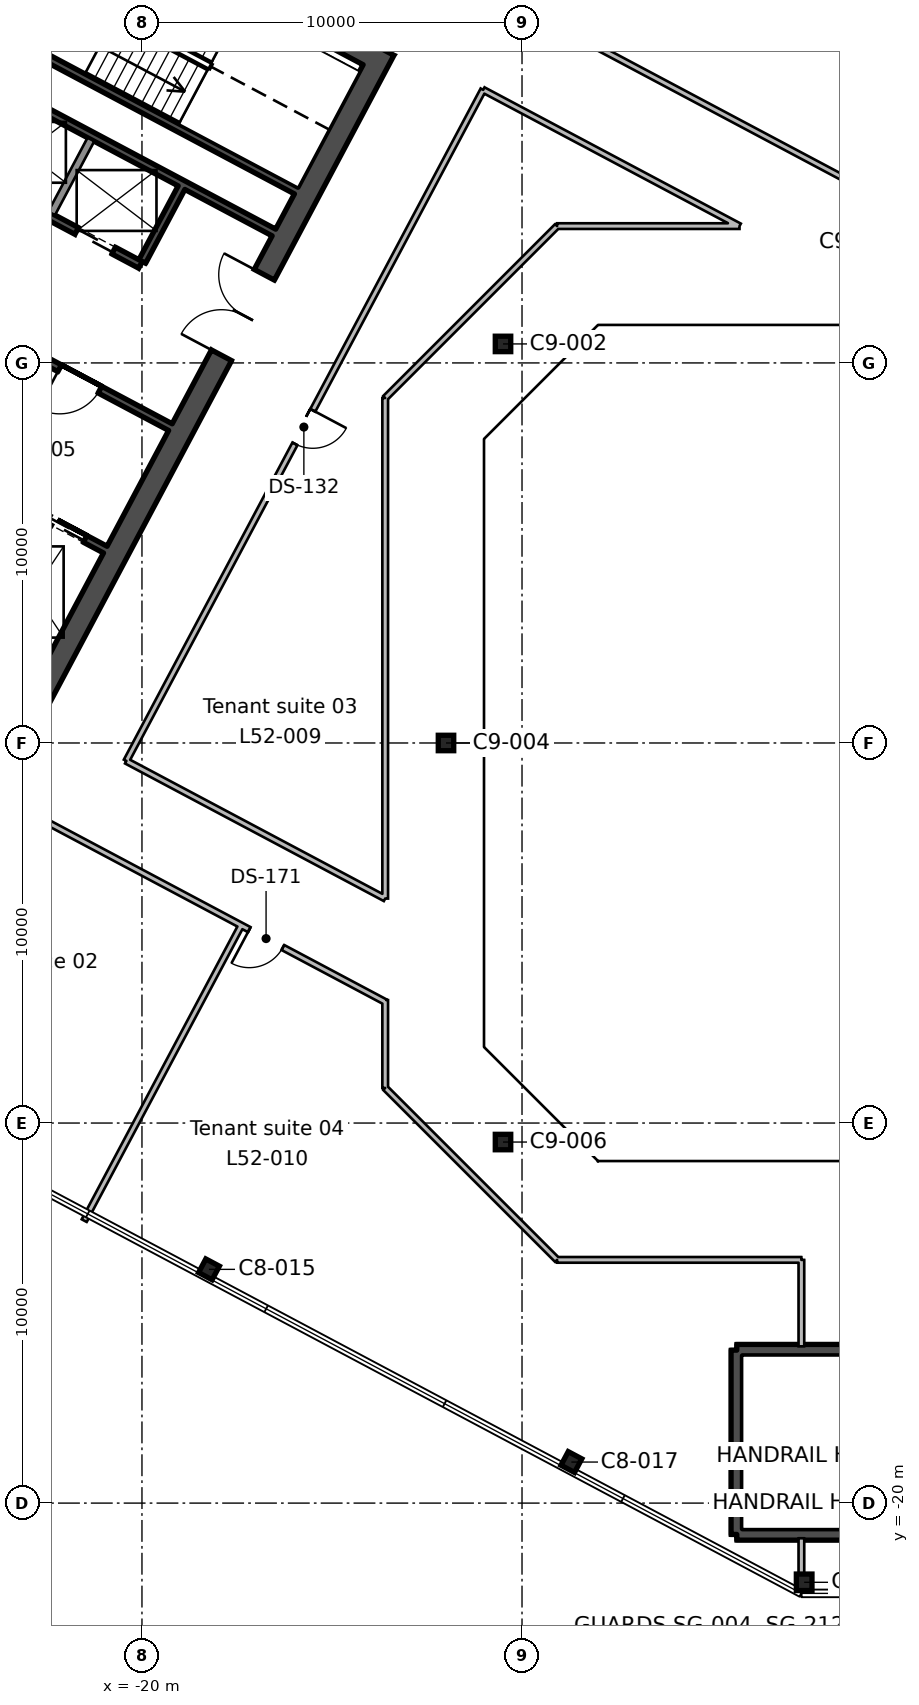
"""IFC4 building model, lengths in metres.
Left out: names, types, materials, properties, quantities, classifications, styles, units other than length and angle.
Written with IfcOpenShell. Run it as: python <this file> out.ifc"""

import sys

from ifc_helpers import new_model, si_unit, direction, frame, frame_2d, origin, origin_2d, place, context, subcontext, project, spatial, rectangle, hollow_rectangle, i_section, extrude, element, fill, save


model = new_model("IFC4")
c1 = context("Model", 3, precision=1e-05, world=origin(), true_north=direction((0.0, 1.0)))
c2 = subcontext(c1, "Body", "Model", "MODEL_VIEW")
j1 = project(units=[si_unit("LENGTHUNIT", "METRE"), si_unit("PLANEANGLEUNIT", "RADIAN")], contexts=[c1])
p1 = place(None, origin())
s1 = spatial("IfcSite", under=j1, at=p1, CompositionType="ELEMENT")
p2 = place(p1, origin())
s2 = spatial("IfcBuilding", under=s1, at=p2, CompositionType="ELEMENT")
p3 = place(p2, frame((0.0, 0.0, 236.4)))
s3 = spatial("IfcBuildingStorey", under=s2, at=p3, CompositionType="ELEMENT", Elevation=236.4)
p4 = place(p3, frame((-2.576, -22.084, 0.0), z_axis=(0.0, 0.0, 1.0), x_axis=(1.0, 0.0, 0.0)))
e1 = element("IfcColumn", 1, at=p4, inside=s3, PredefinedType="COLUMN", context=c2, shape_type="SweptSolid", body=[
    extrude(i_section(OverallWidth=0.412, OverallDepth=0.434, WebThickness=0.036, FlangeThickness=0.057, FilletRadius=0.015, at=origin_2d()), origin(), (0.0, 0.0, 1.0), 3.9),
])
for number, where, z_axis, x_axis in (
    (2, (-8.701, -18.92, 0.0), (0.0, 0.0, 1.0), (0.883, -0.469, 0.0)),
    (3, (-18.237, -13.85, 0.0), (0.0, 0.0, 1.0), (0.883, -0.469, 0.0)),
):
    element("IfcColumn", number, at=place(p3, frame(where, z_axis=z_axis, x_axis=x_axis)), inside=s3, PredefinedType="COLUMN", context=c2, shape_type="SweptSolid", body=[
        extrude(i_section(OverallWidth=0.404, OverallDepth=0.406, WebThickness=0.027, FlangeThickness=0.044, FilletRadius=0.015, at=origin_2d()), origin(), (0.0, 0.0, 1.0), 3.9),
    ])
for number, where, z_axis, x_axis in (
    (4, (-10.5, -10.5, 0.0), (0.0, 0.0, 1.0), (1.0, 0.0, 0.0)),
    (5, (-12.0, 0.0, 0.0), (0.0, 0.0, 1.0), (1.0, 0.0, 0.0)),
    (6, (-10.5, 10.5, 0.0), (0.0, 0.0, 1.0), (1.0, 0.0, 0.0)),
):
    element("IfcColumn", number, at=place(p3, frame(where, z_axis=z_axis, x_axis=x_axis)), inside=s3, PredefinedType="COLUMN", context=c2, shape_type="SweptSolid", body=[
        extrude(hollow_rectangle(XDim=0.406, YDim=0.406, WallThickness=0.015, InnerFilletRadius=0.007, OuterFilletRadius=0.022, at=origin_2d()), origin(), (0.0, 0.0, 1.0), 3.9),
    ])
p5 = place(p3, frame((-13.635, 18.236, 0.0), z_axis=(0.0, 0.0, 1.0), x_axis=(-0.469478769487, -0.88294376095, 0.0)))
e7 = element("IfcWall", 7, at=p5, inside=s3, PredefinedType="SHEAR", context=c2, shape_type="SweptSolid", body=[
    extrude(rectangle(XDim=19.4, YDim=0.6, at=frame_2d((9.7, 0.0))), origin(), (0.0, 0.0, 1.0), 3.9),
])
p6 = place(p5, frame((6.7, 0.0, 0.0)))
e8 = element("IfcOpeningElement", 8, at=p6, cuts=e7, PredefinedType="OPENING", context=c2, shape_type="SweptSolid", body=[
    extrude(rectangle(XDim=2.4, YDim=2.4, at=frame_2d((1.2, 1.2))), frame((0.0, 0.31, 0.0), z_axis=(0.0, -1.0, 0.0), x_axis=(1.0, 0.0, 0.0)), (0.0, 0.0, 1.0), 0.62),
])
p7 = place(p3, frame((-14.041, 18.112, 0.0), z_axis=(0.0, 0.0, 1.0), x_axis=(-0.882947755831, 0.46947125628, 0.0)))
e9 = element("IfcWall", 9, at=p7, inside=s3, PredefinedType="SHEAR", context=c2, shape_type="SweptSolid", body=[
    extrude(rectangle(XDim=20.2, YDim=0.6, at=frame_2d((10.1, 0.0))), origin(), (0.0, 0.0, 1.0), 3.9),
])
p8 = place(p3, frame((-18.96, 14.611, 0.0), z_axis=(0.0, 0.0, 1.0), x_axis=(-0.4694473164, -0.882960484464, 0.0)))
e10 = element("IfcWall", 10, at=p8, inside=s3, PredefinedType="SHEAR", context=c2, shape_type="SweptSolid", body=[
    extrude(rectangle(XDim=2.2, YDim=0.2, at=frame_2d((1.1, 0.0))), origin(), (0.0, 0.0, 1.0), 3.9),
])
p9 = place(p3, frame((-21.344, 15.879, 0.0), z_axis=(0.0, 0.0, 1.0), x_axis=(-0.4694473164, -0.882960484464, 0.0)))
e11 = element("IfcWall", 11, at=p9, inside=s3, PredefinedType="SOLIDWALL", context=c2, shape_type="SweptSolid", body=[
    extrude(rectangle(XDim=2.2, YDim=0.2, at=frame_2d((1.1, 0.0))), origin(), (0.0, 0.0, 1.0), 3.9),
])
p10 = place(p3, frame((-21.333, 21.649, 0.0), z_axis=(0.0, 0.0, 1.0), x_axis=(-0.469494272526, -0.882935517501, 0.0)))
e12 = element("IfcWall", 12, at=p10, inside=s3, PredefinedType="SHEAR", context=c2, shape_type="SweptSolid", body=[
    extrude(rectangle(XDim=7.3, YDim=0.2, at=frame_2d((3.65, 0.0))), origin(), (0.0, 0.0, 1.0), 3.9),
])
p11 = place(p10, frame((1.3, 0.0, 0.0)))
e13 = element("IfcOpeningElement", 13, at=p11, cuts=e12, PredefinedType="OPENING", context=c2, shape_type="SweptSolid", body=[
    extrude(rectangle(XDim=1.2, YDim=2.1, at=frame_2d((0.6, 1.05))), frame((0.0, 0.11, 0.0), z_axis=(0.0, -1.0, 0.0), x_axis=(1.0, 0.0, 0.0)), (0.0, 0.0, 1.0), 0.22),
])
p12 = place(p3, frame((-15.942, 14.536, 0.0), z_axis=(0.0, 0.0, 1.0), x_axis=(-0.882946947542, 0.469472776449, 0.0)))
e14 = element("IfcWall", 14, at=p12, inside=s3, PredefinedType="SHEAR", context=c2, shape_type="SweptSolid", body=[
    extrude(rectangle(XDim=8.0, YDim=0.2, at=frame_2d((4.0, 0.0))), origin(), (0.0, 0.0, 1.0), 3.9),
])
p13 = place(p3, frame((-16.529, 13.432, 0.0), z_axis=(0.0, 0.0, 1.0), x_axis=(-0.88295287151, 0.469461634952, 0.0)))
e15 = element("IfcWall", 15, at=p13, inside=s3, PredefinedType="SHEAR", context=c2, shape_type="SweptSolid", body=[
    extrude(rectangle(XDim=8.0, YDim=0.2, at=frame_2d((4.0, 0.0))), origin(), (0.0, 0.0, 1.0), 3.9),
])
p14 = place(p3, frame((-20.04, 12.581, 0.0), z_axis=(0.0, 0.0, 1.0), x_axis=(-0.882942972946, 0.469480251476, 0.0)))
e16 = element("IfcWall", 16, at=p14, inside=s3, PredefinedType="SHEAR", context=c2, shape_type="SweptSolid", body=[
    extrude(rectangle(XDim=5.4, YDim=0.2, at=frame_2d((2.7, 0.0))), origin(), (0.0, 0.0, 1.0), 3.9),
])
p15 = place(p14, frame((0.8, 0.0, 0.0)))
e17 = element("IfcOpeningElement", 17, at=p15, cuts=e16, PredefinedType="OPENING", context=c2, shape_type="SweptSolid", body=[
    extrude(rectangle(XDim=1.1, YDim=2.1, at=frame_2d((0.55, 1.05))), frame((0.0, 0.11, 0.0), z_axis=(0.0, -1.0, 0.0), x_axis=(1.0, 0.0, 0.0)), (0.0, 0.0, 1.0), 0.22),
])
p16 = place(p14, frame((3.5, 0.0, 0.0)))
e18 = element("IfcOpeningElement", 18, at=p16, cuts=e16, PredefinedType="OPENING", context=c2, shape_type="SweptSolid", body=[
    extrude(rectangle(XDim=1.1, YDim=2.1, at=frame_2d((0.55, 1.05))), frame((0.0, 0.11, 0.0), z_axis=(0.0, -1.0, 0.0), x_axis=(1.0, 0.0, 0.0)), (0.0, 0.0, 1.0), 0.22),
])
p17 = place(p3, frame((-19.252, 8.311, 0.0), z_axis=(0.0, 0.0, 1.0), x_axis=(-0.882955722218, 0.469456273365, 0.0)))
e19 = element("IfcWall", 19, at=p17, inside=s3, PredefinedType="SHEAR", context=c2, shape_type="SweptSolid", body=[
    extrude(rectangle(XDim=10.0, YDim=0.2, at=frame_2d((5.0, 0.0))), origin(), (0.0, 0.0, 1.0), 3.9),
])
p18 = place(p17, frame((2.1, 0.0, 0.0)))
e20 = element("IfcOpeningElement", 20, at=p18, cuts=e19, PredefinedType="OPENING", context=c2, shape_type="SweptSolid", body=[
    extrude(rectangle(XDim=1.2, YDim=2.1, at=frame_2d((0.6, 1.05))), frame((0.0, 0.11, 0.0), z_axis=(0.0, -1.0, 0.0), x_axis=(1.0, 0.0, 0.0)), (0.0, 0.0, 1.0), 0.22),
])
p19 = place(p17, frame((4.96, 0.0, 0.0)))
e21 = element("IfcOpeningElement", 21, at=p19, cuts=e19, PredefinedType="OPENING", context=c2, shape_type="SweptSolid", body=[
    extrude(rectangle(XDim=0.9, YDim=2.1, at=frame_2d((0.45, 1.05))), frame((0.0, 0.11, 0.0), z_axis=(0.0, -1.0, 0.0), x_axis=(1.0, 0.0, 0.0)), (0.0, 0.0, 1.0), 0.22),
])
p20 = place(p17, frame((7.66, 0.0, 0.0)))
e22 = element("IfcOpeningElement", 22, at=p20, cuts=e19, PredefinedType="OPENING", context=c2, shape_type="SweptSolid", body=[
    extrude(rectangle(XDim=0.9, YDim=2.1, at=frame_2d((0.45, 1.05))), frame((0.0, 0.11, 0.0), z_axis=(0.0, -1.0, 0.0), x_axis=(1.0, 0.0, 0.0)), (0.0, 0.0, 1.0), 0.22),
])
p21 = place(p3, frame((-20.965, 5.088, 0.0), z_axis=(0.0, 0.0, 1.0), x_axis=(-0.882925986334, 0.469512196493, 0.0)))
e23 = element("IfcWall", 23, at=p21, inside=s3, PredefinedType="SHEAR", context=c2, shape_type="SweptSolid", body=[
    extrude(rectangle(XDim=4.5, YDim=0.2, at=frame_2d((2.25, 0.0))), origin(), (0.0, 0.0, 1.0), 3.9),
])
p22 = place(p21, frame((0.6, 0.0, 0.0)))
e24 = element("IfcOpeningElement", 24, at=p22, cuts=e23, PredefinedType="OPENING", context=c2, shape_type="SweptSolid", body=[
    extrude(rectangle(XDim=1.1, YDim=2.1, at=frame_2d((0.55, 1.05))), frame((0.0, 0.11, 0.0), z_axis=(0.0, -1.0, 0.0), x_axis=(1.0, 0.0, 0.0)), (0.0, 0.0, 1.0), 0.22),
])
p23 = place(p3, frame((3.95, -20.825, 0.0), z_axis=(0.0, 0.0, 1.0), x_axis=(-1.0, 0.0, 0.0)))
e25 = element("IfcWall", 25, at=p23, inside=s3, PredefinedType="SHEAR", context=c2, shape_type="SweptSolid", body=[
    extrude(rectangle(XDim=8.3, YDim=0.3, at=frame_2d((4.15, 0.0))), origin(), (0.0, 0.0, 1.0), 3.9),
])
p24 = place(p3, frame((-4.35, -20.825, 0.0), z_axis=(0.0, 0.0, 1.0), x_axis=(0.0, 1.0, 0.0)))
e26 = element("IfcWall", 26, at=p24, inside=s3, PredefinedType="SHEAR", context=c2, shape_type="SweptSolid", body=[
    extrude(rectangle(XDim=4.85, YDim=0.3, at=frame_2d((2.425, 0.0))), origin(), (0.0, 0.0, 1.0), 3.9),
])
p25 = place(p3, frame((-4.35, -15.975, 0.0), z_axis=(0.0, 0.0, 1.0), x_axis=(1.0, 0.0, 0.0)))
e27 = element("IfcWall", 27, at=p25, inside=s3, PredefinedType="SHEAR", context=c2, shape_type="SweptSolid", body=[
    extrude(rectangle(XDim=8.3, YDim=0.3, at=frame_2d((4.15, 0.0))), origin(), (0.0, 0.0, 1.0), 3.9),
])
p26 = place(p25, frame((6.05, 0.0, 0.0)))
e28 = element("IfcOpeningElement", 28, at=p26, cuts=e27, PredefinedType="OPENING", context=c2, shape_type="SweptSolid", body=[
    extrude(rectangle(XDim=1.9, YDim=2.1, at=frame_2d((0.95, 1.05))), frame((0.0, 0.16, 0.0), z_axis=(0.0, -1.0, 0.0), x_axis=(1.0, 0.0, 0.0)), (0.0, 0.0, 1.0), 0.32),
])
p27 = place(p3, frame((-48.541, 39.854, 0.0), z_axis=(0.0, 0.0, 1.0), x_axis=(0.882945008423, -0.469476423372, 0.0)))
e29 = element("IfcWall", 29, at=p27, inside=s3, PredefinedType="PARTITIONING", context=c2, shape_type="SweptSolid", body=[
    extrude(rectangle(XDim=54.976, YDim=0.15, at=frame_2d((27.488, 0.0))), origin(), (0.0, 0.0, 1.0), 3.54),
])
p28 = place(p27, frame((39.35, 0.0, 0.0)))
e30 = element("IfcOpeningElement", 30, at=p28, cuts=e29, PredefinedType="OPENING", context=c2, shape_type="SweptSolid", body=[
    extrude(rectangle(XDim=1.0, YDim=2.1, at=frame_2d((0.5, 1.05))), frame((0.0, 0.085, 0.0), z_axis=(0.0, -1.0, 0.0), x_axis=(1.0, 0.0, 0.0)), (0.0, 0.0, 1.0), 0.17),
])
p29 = place(p27, frame((26.55, 0.0, 0.0)))
e31 = element("IfcOpeningElement", 31, at=p29, cuts=e29, PredefinedType="OPENING", context=c2, shape_type="SweptSolid", body=[
    extrude(rectangle(XDim=1.8, YDim=2.1, at=frame_2d((0.9, 1.05))), frame((0.0, 0.085, 0.0), z_axis=(0.0, -1.0, 0.0), x_axis=(1.0, 0.0, 0.0)), (0.0, 0.0, 1.0), 0.17),
])
p30 = place(p27, frame((15.35, 0.0, 0.0)))
e32 = element("IfcOpeningElement", 32, at=p30, cuts=e29, PredefinedType="OPENING", context=c2, shape_type="SweptSolid", body=[
    extrude(rectangle(XDim=1.0, YDim=2.1, at=frame_2d((0.5, 1.05))), frame((0.0, 0.085, 0.0), z_axis=(0.0, -1.0, 0.0), x_axis=(1.0, 0.0, 0.0)), (0.0, 0.0, 1.0), 0.17),
])
p31 = place(p3, frame((-13.6, -6.813, 0.0), z_axis=(0.0, 0.0, 1.0), x_axis=(-0.8829403307, 0.469485220666, 0.0)))
e33 = element("IfcWall", 33, at=p31, inside=s3, PredefinedType="PARTITIONING", context=c2, shape_type="SweptSolid", body=[
    extrude(rectangle(XDim=36.798, YDim=0.15, at=frame_2d((18.399, 0.0))), origin(), (0.0, 0.0, 1.0), 3.54),
])
p32 = place(p31, frame((34.45, 0.0, 0.0)))
e34 = element("IfcOpeningElement", 34, at=p32, cuts=e33, PredefinedType="OPENING", context=c2, shape_type="SweptSolid", body=[
    extrude(rectangle(XDim=1.0, YDim=2.1, at=frame_2d((0.5, 1.05))), frame((0.0, 0.085, 0.0), z_axis=(0.0, -1.0, 0.0), x_axis=(1.0, 0.0, 0.0)), (0.0, 0.0, 1.0), 0.17),
])
p33 = place(p31, frame((25.75, 0.0, 0.0)))
e35 = element("IfcOpeningElement", 35, at=p33, cuts=e33, PredefinedType="OPENING", context=c2, shape_type="SweptSolid", body=[
    extrude(rectangle(XDim=1.0, YDim=2.1, at=frame_2d((0.5, 1.05))), frame((0.0, 0.085, 0.0), z_axis=(0.0, -1.0, 0.0), x_axis=(1.0, 0.0, 0.0)), (0.0, 0.0, 1.0), 0.17),
])
p34 = place(p31, frame((17.45, 0.0, 0.0)))
e36 = element("IfcOpeningElement", 36, at=p34, cuts=e33, PredefinedType="OPENING", context=c2, shape_type="SweptSolid", body=[
    extrude(rectangle(XDim=1.8, YDim=2.1, at=frame_2d((0.9, 1.05))), frame((0.0, 0.085, 0.0), z_axis=(0.0, -1.0, 0.0), x_axis=(1.0, 0.0, 0.0)), (0.0, 0.0, 1.0), 0.17),
])
p35 = place(p31, frame((3.05, 0.0, 0.0)))
e37 = element("IfcOpeningElement", 37, at=p35, cuts=e33, PredefinedType="OPENING", context=c2, shape_type="SweptSolid", body=[
    extrude(rectangle(XDim=1.0, YDim=2.1, at=frame_2d((0.5, 1.05))), frame((0.0, 0.085, 0.0), z_axis=(0.0, -1.0, 0.0), x_axis=(1.0, 0.0, 0.0)), (0.0, 0.0, 1.0), 0.17),
])
p36 = place(p3, frame((-17.388, -4.798, 0.0), z_axis=(0.0, 0.0, 1.0), x_axis=(-0.469532456729, -0.882915212281, 0.0)))
e38 = element("IfcWall", 38, at=p36, inside=s3, PredefinedType="PARTITIONING", context=c2, shape_type="SweptSolid", body=[
    extrude(rectangle(XDim=8.8, YDim=0.15, at=frame_2d((4.4, 0.0))), origin(), (0.0, 0.0, 1.0), 3.54),
])
p37 = place(p3, frame((-2.649, -13.6, 0.0), z_axis=(0.0, 0.0, 1.0), x_axis=(-1.0, 0.0, 0.0)))
e39 = element("IfcWall", 39, at=p37, inside=s3, PredefinedType="PARTITIONING", context=c2, shape_type="SweptSolid", body=[
    extrude(rectangle(XDim=6.428, YDim=0.15, at=frame_2d((3.214, 0.0))), origin(), (0.0, 0.0, 1.0), 3.54),
])
p38 = place(p3, frame((-9.077, -13.6, 0.0), z_axis=(0.0, 0.0, 1.0), x_axis=(-0.707106781187, 0.707106781187, 0.0)))
e40 = element("IfcWall", 40, at=p38, inside=s3, PredefinedType="PARTITIONING", context=c2, shape_type="SweptSolid", body=[
    extrude(rectangle(XDim=6.397, YDim=0.15, at=frame_2d((3.198, 0.0))), origin(), (0.0, 0.0, 1.0), 3.54),
])
p39 = place(p3, frame((-13.6, -9.077, 0.0), z_axis=(0.0, 0.0, 1.0), x_axis=(0.0, 1.0, 0.0)))
e41 = element("IfcWall", 41, at=p39, inside=s3, PredefinedType="PARTITIONING", context=c2, shape_type="SweptSolid", body=[
    extrude(rectangle(XDim=2.314, YDim=0.15, at=frame_2d((1.157, 0.0))), origin(), (0.0, 0.0, 1.0), 3.54),
])
p40 = place(p3, frame((-2.649, -13.6, 0.0), z_axis=(0.0, 0.0, 1.0), x_axis=(0.0, -1.0, 0.0)))
e42 = element("IfcWall", 42, at=p40, inside=s3, PredefinedType="PARTITIONING", context=c2, shape_type="SweptSolid", body=[
    extrude(rectangle(XDim=2.275, YDim=0.15, at=frame_2d((1.137, 0.0))), origin(), (0.0, 0.0, 1.0), 3.54),
])
p41 = place(p3, frame((-2.649, -20.925, 0.0), z_axis=(0.0, 0.0, 1.0), x_axis=(0.0, -1.0, 0.0)))
e43 = element("IfcWall", 43, at=p41, inside=s3, PredefinedType="PARTITIONING", context=c2, shape_type="SweptSolid", body=[
    extrude(rectangle(XDim=0.942, YDim=0.15, at=frame_2d((0.471, 0.0))), origin(), (0.0, 0.0, 1.0), 3.54),
])
p42 = place(p3, frame((-20.411, -0.473, 0.0), z_axis=(0.0, 0.0, 1.0), x_axis=(0.469451816494, 0.882958091865, 0.0)))
e44 = element("IfcWall", 44, at=p42, inside=s3, PredefinedType="PARTITIONING", context=c2, shape_type="SweptSolid", body=[
    extrude(rectangle(XDim=20.0, YDim=0.15, at=frame_2d((10.0, 0.0))), origin(), (0.0, 0.0, 1.0), 3.54),
])
p43 = place(p42, frame((9.45, 0.0, 0.0)))
e45 = element("IfcOpeningElement", 45, at=p43, cuts=e44, PredefinedType="OPENING", context=c2, shape_type="SweptSolid", body=[
    extrude(rectangle(XDim=1.0, YDim=2.1, at=frame_2d((0.5, 1.05))), frame((0.0, 0.085, 0.0), z_axis=(0.0, -1.0, 0.0), x_axis=(1.0, 0.0, 0.0)), (0.0, 0.0, 1.0), 0.17),
])
p44 = place(p3, frame((-11.022, 17.186, 0.0), z_axis=(0.0, 0.0, 1.0), x_axis=(0.882967947403, -0.469433279453, 0.0)))
e46 = element("IfcWall", 46, at=p44, inside=s3, PredefinedType="PARTITIONING", context=c2, shape_type="SweptSolid", body=[
    extrude(rectangle(XDim=7.639, YDim=0.15, at=frame_2d((3.819, 0.0))), origin(), (0.0, 0.0, 1.0), 3.54),
])
p45 = place(p3, frame((-4.277, 13.6, 0.0), z_axis=(0.0, 0.0, 1.0), x_axis=(-1.0, 0.0, 0.0)))
e47 = element("IfcWall", 47, at=p45, inside=s3, PredefinedType="PARTITIONING", context=c2, shape_type="SweptSolid", body=[
    extrude(rectangle(XDim=4.8, YDim=0.15, at=frame_2d((2.4, 0.0))), origin(), (0.0, 0.0, 1.0), 3.54),
])
p46 = place(p3, frame((-9.077, 13.6, 0.0), z_axis=(0.0, 0.0, 1.0), x_axis=(-0.707106781187, -0.707106781187, 0.0)))
e48 = element("IfcWall", 48, at=p46, inside=s3, PredefinedType="PARTITIONING", context=c2, shape_type="SweptSolid", body=[
    extrude(rectangle(XDim=6.397, YDim=0.15, at=frame_2d((3.198, 0.0))), origin(), (0.0, 0.0, 1.0), 3.54),
])
p47 = place(p3, frame((-13.6, 9.077, 0.0), z_axis=(0.0, 0.0, 1.0), x_axis=(0.0, -1.0, 0.0)))
e49 = element("IfcWall", 49, at=p47, inside=s3, PredefinedType="PARTITIONING", context=c2, shape_type="SweptSolid", body=[
    extrude(rectangle(XDim=13.171, YDim=0.15, at=frame_2d((6.585, 0.0))), origin(), (0.0, 0.0, 1.0), 3.54),
])
p48 = place(p3, frame((-13.6, -4.094, 0.0), z_axis=(0.0, 0.0, 1.0), x_axis=(-0.882961998231, 0.469444469218, 0.0)))
e50 = element("IfcWall", 50, at=p48, inside=s3, PredefinedType="PARTITIONING", context=c2, shape_type="SweptSolid", body=[
    extrude(rectangle(XDim=7.714, YDim=0.15, at=frame_2d((3.857, 0.0))), origin(), (0.0, 0.0, 1.0), 3.54),
])
p49 = place(p6, frame((2.4, 0.0, 0.0), z_axis=(0.0, 0.0, 1.0), x_axis=(-1.0, 0.0, 0.0)))
e51 = element("IfcDoor", 51, at=p49, inside=s3, OperationType="DOUBLE_DOOR_SINGLE_SWING", PredefinedType="DOOR", context=c2, shape_type="SweptSolid", body=[
    extrude(rectangle(XDim=2.4, YDim=2.4, at=frame_2d((1.2, 1.2))), frame((0.0, 0.025, 0.0), z_axis=(0.0, -1.0, 0.0), x_axis=(1.0, 0.0, 0.0)), (0.0, 0.0, 1.0), 0.05),
])
fill(e8, e51)
p50 = place(p18, origin())
e52 = element("IfcDoor", 52, at=p50, inside=s3, OperationType="SINGLE_SWING_RIGHT", PredefinedType="DOOR", context=c2, shape_type="SweptSolid", body=[
    extrude(rectangle(XDim=1.2, YDim=2.1, at=frame_2d((0.6, 1.05))), frame((0.0, 0.025, 0.0), z_axis=(0.0, -1.0, 0.0), x_axis=(1.0, 0.0, 0.0)), (0.0, 0.0, 1.0), 0.05),
])
fill(e20, e52)
p51 = place(p15, origin())
e53 = element("IfcDoor", 53, at=p51, inside=s3, OperationType="DOUBLE_DOOR_SLIDING", PredefinedType="DOOR", context=c2, shape_type="SweptSolid", body=[
    extrude(rectangle(XDim=1.1, YDim=2.1, at=frame_2d((0.55, 1.05))), frame((0.0, 0.025, 0.0), z_axis=(0.0, -1.0, 0.0), x_axis=(1.0, 0.0, 0.0)), (0.0, 0.0, 1.0), 0.05),
])
fill(e17, e53)
p52 = place(p22, origin())
e54 = element("IfcDoor", 54, at=p52, inside=s3, OperationType="DOUBLE_DOOR_SLIDING", PredefinedType="DOOR", context=c2, shape_type="SweptSolid", body=[
    extrude(rectangle(XDim=1.1, YDim=2.1, at=frame_2d((0.55, 1.05))), frame((0.0, 0.025, 0.0), z_axis=(0.0, -1.0, 0.0), x_axis=(1.0, 0.0, 0.0)), (0.0, 0.0, 1.0), 0.05),
])
fill(e24, e54)
p53 = place(p35, origin())
e55 = element("IfcDoor", 55, at=p53, inside=s3, OperationType="SINGLE_SWING_RIGHT", PredefinedType="DOOR", context=c2, shape_type="SweptSolid", body=[
    extrude(rectangle(XDim=1.0, YDim=2.1, at=frame_2d((0.5, 1.05))), frame((0.0, 0.025, 0.0), z_axis=(0.0, -1.0, 0.0), x_axis=(1.0, 0.0, 0.0)), (0.0, 0.0, 1.0), 0.05),
])
fill(e37, e55)
p54 = place(p43, frame((1.0, 0.0, 0.0), z_axis=(0.0, 0.0, 1.0), x_axis=(-1.0, 0.0, 0.0)))
e56 = element("IfcDoor", 56, at=p54, inside=s3, OperationType="SINGLE_SWING_LEFT", PredefinedType="DOOR", context=c2, shape_type="SweptSolid", body=[
    extrude(rectangle(XDim=1.0, YDim=2.1, at=frame_2d((0.5, 1.05))), frame((0.0, 0.025, 0.0), z_axis=(0.0, -1.0, 0.0), x_axis=(1.0, 0.0, 0.0)), (0.0, 0.0, 1.0), 0.05),
])
fill(e45, e56)
save(model, sys.argv[1])
